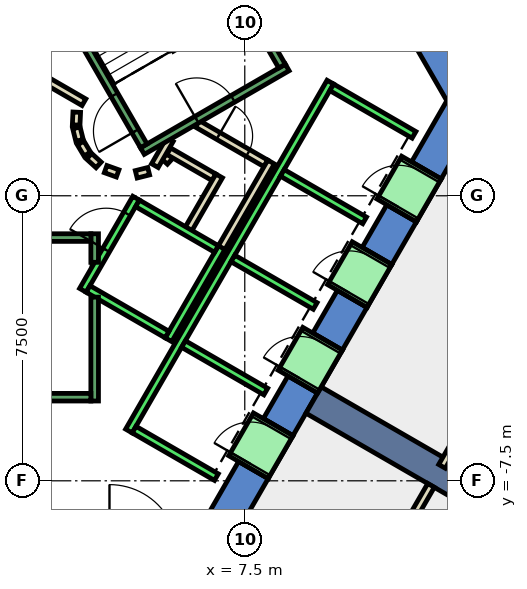
"""IFC4 building model, lengths in metres.
Left out: names, types, materials, properties, quantities, classifications, styles, units other than length and angle.
Written with IfcOpenShell. Run it as: python <this file> out.ifc"""

import sys

from ifc_helpers import new_model, si_unit, direction, frame, frame_2d, origin, place, context, subcontext, project, spatial, polyline, rectangle, outline, extrude, element, fill, save


model = new_model("IFC4")
c1 = context("Model", 3, precision=1e-05, world=origin(), true_north=direction((0.0, 1.0)))
c2 = subcontext(c1, "Body", "Model", "MODEL_VIEW")
j1 = project(units=[si_unit("LENGTHUNIT", "METRE"), si_unit("PLANEANGLEUNIT", "RADIAN")], contexts=[c1])
p1 = place(None, origin())
s1 = spatial("IfcSite", under=j1, at=p1, CompositionType="ELEMENT")
p2 = place(p1, origin())
s2 = spatial("IfcBuilding", under=s1, at=p2, CompositionType="ELEMENT")
p3 = place(p2, frame((0.0, 0.0, 107.6)))
s3 = spatial("IfcBuildingStorey", under=s2, at=p3, CompositionType="ELEMENT", Elevation=107.6)
p4 = place(p3, frame((0.0, 0.0, -0.4)))
e1 = element("IfcWall", 1, at=p4, inside=s3, PredefinedType="SHEAR", context=c2, shape_type="SweptSolid", body=[
    extrude(outline(polyline([(8.517, 11.748), (7.738, 11.298), (12.817, 2.5), (13.856, 2.5), (8.517, 11.748)])), origin(), (0.0, 0.0, 1.0), 4.2),
])
p5 = place(p3, frame((0.0, 0.0, -0.4)))
e2 = element("IfcWall", 2, at=p5, inside=s3, PredefinedType="SHEAR", context=c2, shape_type="SweptSolid", body=[
    extrude(outline(polyline([(8.117, -7.44), (7.338, -6.99), (6.409, -8.6), (6.928, -9.5), (8.117, -7.44)])), origin(), (0.0, 0.0, 1.0), 4.2),
])
p6 = place(p3, frame((0.0, 0.0, -0.4)))
e3 = element("IfcWall", 3, at=p6, inside=s3, PredefinedType="SHEAR", context=c2, shape_type="SweptSolid", body=[
    extrude(outline(polyline([(9.417, -5.189), (8.638, -4.739), (7.988, -5.864), (8.767, -6.314), (9.417, -5.189)])), origin(), (0.0, 0.0, 1.0), 4.2),
])
p7 = place(p3, frame((0.0, 0.0, -0.4)))
e4 = element("IfcWall", 4, at=p7, inside=s3, PredefinedType="SHEAR", context=c2, shape_type="SweptSolid", body=[
    extrude(outline(polyline([(10.717, -2.937), (9.938, -2.487), (9.288, -3.613), (10.067, -4.063), (10.717, -2.937)])), origin(), (0.0, 0.0, 1.0), 4.2),
])
p8 = place(p3, frame((0.0, 0.0, -0.4)))
e5 = element("IfcWall", 5, at=p8, inside=s3, PredefinedType="SHEAR", context=c2, shape_type="SweptSolid", body=[
    extrude(outline(polyline([(12.017, -0.686), (11.238, -0.236), (10.588, -1.361), (11.367, -1.811), (12.017, -0.686)])), origin(), (0.0, 0.0, 1.0), 4.2),
])
p9 = place(p3, frame((0.0, 0.0, -0.4)))
e6 = element("IfcWall", 6, at=p9, inside=s3, PredefinedType="SHEAR", context=c2, shape_type="SweptSolid", body=[
    extrude(outline(polyline([(11.888, 0.89), (12.667, 0.44), (13.856, 2.5), (12.817, 2.5), (11.888, 0.89)])), origin(), (0.0, 0.0, 1.0), 4.2),
])
p10 = place(p3, frame((0.0, 0.0, 3.6)))
e7 = element("IfcWall", 7, at=p10, inside=s3, PredefinedType="SHEAR", context=c2, shape_type="SweptSolid", body=[
    extrude(outline(polyline([(8.767, -6.314), (7.988, -5.864), (7.338, -6.99), (8.117, -7.44), (8.767, -6.314)])), origin(), (0.0, 0.0, 1.0), 0.2),
])
p11 = place(p3, frame((0.0, 0.0, 3.6)))
e8 = element("IfcWall", 8, at=p11, inside=s3, PredefinedType="SHEAR", context=c2, shape_type="SweptSolid", body=[
    extrude(outline(polyline([(10.067, -4.063), (9.288, -3.613), (8.638, -4.739), (9.417, -5.189), (10.067, -4.063)])), origin(), (0.0, 0.0, 1.0), 0.2),
])
p12 = place(p3, frame((0.0, 0.0, 3.6)))
e9 = element("IfcWall", 9, at=p12, inside=s3, PredefinedType="SHEAR", context=c2, shape_type="SweptSolid", body=[
    extrude(outline(polyline([(11.367, -1.811), (10.588, -1.361), (9.938, -2.487), (10.717, -2.937), (11.367, -1.811)])), origin(), (0.0, 0.0, 1.0), 0.2),
])
p13 = place(p3, frame((0.0, 0.0, 3.6)))
e10 = element("IfcWall", 10, at=p13, inside=s3, PredefinedType="SHEAR", context=c2, shape_type="SweptSolid", body=[
    extrude(outline(polyline([(12.667, 0.44), (11.888, 0.89), (11.238, -0.236), (12.017, -0.686), (12.667, 0.44)])), origin(), (0.0, 0.0, 1.0), 0.2),
])
p14 = place(p3, frame((9.31, -5.375, -0.4), z_axis=(0.0, 0.0, 1.0), x_axis=(0.866017533419, -0.500013631625, 0.0)))
e11 = element("IfcWall", 11, at=p14, inside=s3, PredefinedType="SHEAR", context=c2, shape_type="SweptSolid", body=[
    extrude(rectangle(XDim=9.0, YDim=0.8, at=frame_2d((4.5, 0.0))), origin(), (0.0, 0.0, 1.0), 4.2),
])
p15 = place(p3, frame((5.39, 0.898, 0.0), z_axis=(0.0, 0.0, 1.0), x_axis=(0.673828488714, 0.738887791073, 0.0)))
e12 = element("IfcWall", 12, at=p15, inside=s3, PredefinedType="PARTITIONING", context=c2, shape_type="SweptSolid", body=[
    extrude(rectangle(XDim=0.263, YDim=0.2, at=frame_2d((0.131, 0.0))), origin(), (0.0, 0.0, 1.0), 3.8),
])
p16 = place(p3, frame((5.499, 1.172, 0.0), z_axis=(0.0, 0.0, 1.0), x_axis=(0.866333505267, -0.499465972466, 0.0)))
e13 = element("IfcWall", 13, at=p16, inside=s3, PredefinedType="PARTITIONING", context=c2, shape_type="SweptSolid", body=[
    extrude(rectangle(XDim=1.374, YDim=0.2, at=frame_2d((0.687, 0.0))), origin(), (0.0, 0.0, 1.0), 3.8),
])
p17 = place(p3, frame((6.826, 0.522, 0.0), z_axis=(0.0, 0.0, 1.0), x_axis=(-0.500016722714, -0.866015748706, 0.0)))
e14 = element("IfcWall", 14, at=p17, inside=s3, PredefinedType="PARTITIONING", context=c2, shape_type="SweptSolid", body=[
    extrude(rectangle(XDim=1.7, YDim=0.2, at=frame_2d((0.85, 0.0))), origin(), (0.0, 0.0, 1.0), 3.8),
])
p18 = place(p3, frame((6.25, 1.894, 0.0), z_axis=(0.0, 0.0, 1.0), x_axis=(0.866043184279, -0.499969202016, 0.0)))
e15 = element("IfcWall", 15, at=p18, inside=s3, PredefinedType="PARTITIONING", context=c2, shape_type="SweptSolid", body=[
    extrude(rectangle(XDim=2.084, YDim=0.2, at=frame_2d((1.042, 0.0))), origin(), (0.0, 0.0, 1.0), 3.8),
])
p19 = place(p18, frame((0.642, 0.0, 0.0)))
e16 = element("IfcOpeningElement", 16, at=p19, cuts=e15, PredefinedType="OPENING", context=c2, shape_type="SweptSolid", body=[
    extrude(rectangle(XDim=0.9, YDim=2.1, at=frame_2d((0.45, 1.05))), frame((0.0, 0.11, 0.0), z_axis=(0.0, -1.0, 0.0), x_axis=(1.0, 0.0, 0.0)), (0.0, 0.0, 1.0), 0.22),
])
p20 = place(p3, frame((8.192, 0.888, 0.0), z_axis=(0.0, 0.0, 1.0), x_axis=(-0.499940625693, -0.866059680843, 0.0)))
e17 = element("IfcWall", 17, at=p20, inside=s3, PredefinedType="PARTITIONING", context=c2, shape_type="SweptSolid", body=[
    extrude(rectangle(XDim=2.68, YDim=0.2, at=frame_2d((1.34, 0.0))), origin(), (0.0, 0.0, 1.0), 3.8),
])
p21 = place(p3, frame((5.135, 0.793, 0.0), z_axis=(0.0, 0.0, 1.0), x_axis=(0.499526442893, 0.866298639529, 0.0)))
e18 = element("IfcWall", 18, at=p21, inside=s3, PredefinedType="PARTITIONING", context=c2, shape_type="SweptSolid", body=[
    extrude(rectangle(XDim=0.791, YDim=0.2, at=frame_2d((0.396, 0.0))), origin(), (0.0, 0.0, 1.0), 3.8),
])
p22 = place(p3, frame((2.012, 3.186, 0.0), z_axis=(0.0, 0.0, 1.0), x_axis=(0.865891012941, -0.500232699559, 0.0)))
e19 = element("IfcWall", 19, at=p22, inside=s3, PredefinedType="PARTITIONING", context=c2, shape_type="SweptSolid", body=[
    extrude(rectangle(XDim=1.449, YDim=0.2, at=frame_2d((0.725, 0.0))), origin(), (0.0, 0.0, 1.0), 3.8),
])
p23 = place(p3, frame((3.079, 2.199, 0.0), z_axis=(0.0, 0.0, 1.0), x_axis=(-0.047771483479, -0.998858290933, 0.0)))
e20 = element("IfcWall", 20, at=p23, inside=s3, PredefinedType="PARTITIONING", context=c2, shape_type="SweptSolid", body=[
    extrude(rectangle(XDim=0.337, YDim=0.2, at=frame_2d((0.169, 0.0))), origin(), (0.0, 0.0, 1.0), 3.8),
])
p24 = place(p3, frame((3.07, 1.786, 0.0), z_axis=(0.0, 0.0, 1.0), x_axis=(0.242705583207, -0.970099994784, 0.0)))
e21 = element("IfcWall", 21, at=p24, inside=s3, PredefinedType="PARTITIONING", context=c2, shape_type="SweptSolid", body=[
    extrude(rectangle(XDim=0.338, YDim=0.2, at=frame_2d((0.169, 0.0))), origin(), (0.0, 0.0, 1.0), 3.8),
])
for number, where, z_axis, x_axis in (
    (22, (3.182, 1.388, 0.0), (0.0, 0.0, 1.0), (0.512, -0.859, 0.0)),
    (23, (3.404, 1.039, 0.0), (0.0, 0.0, 1.0), (0.74, -0.672, 0.0)),
):
    element("IfcWall", number, at=place(p3, frame(where, z_axis=z_axis, x_axis=x_axis)), inside=s3, PredefinedType="PARTITIONING", context=c2, shape_type="SweptSolid", body=[
        extrude(rectangle(XDim=0.338, YDim=0.2, at=frame_2d((0.169, 0.0))), origin(), (0.0, 0.0, 1.0), 3.8),
    ])
p25 = place(p3, frame((3.838, 0.702, 0.0), z_axis=(0.0, 0.0, 1.0), x_axis=(0.941035081519, -0.338308993895, 0.0)))
e24 = element("IfcWall", 24, at=p25, inside=s3, PredefinedType="PARTITIONING", context=c2, shape_type="SweptSolid", body=[
    extrude(rectangle(XDim=0.337, YDim=0.2, at=frame_2d((0.168, 0.0))), origin(), (0.0, 0.0, 1.0), 3.8),
])
p26 = place(p3, frame((4.644, 0.564, 0.0), z_axis=(0.0, 0.0, 1.0), x_axis=(0.969929076366, 0.243387729394, 0.0)))
e25 = element("IfcWall", 25, at=p26, inside=s3, PredefinedType="PARTITIONING", context=c2, shape_type="SweptSolid", body=[
    extrude(rectangle(XDim=0.337, YDim=0.2, at=frame_2d((0.168, 0.0))), origin(), (0.0, 0.0, 1.0), 3.8),
])
p27 = place(p3, frame((12.401, -7.621, 0.0), z_axis=(0.0, 0.0, 1.0), x_axis=(-0.499983724212, -0.866034800411, 0.0)))
e26 = element("IfcWall", 26, at=p27, inside=s3, PredefinedType="PARTITIONING", context=c2, shape_type="SweptSolid", body=[
    extrude(rectangle(XDim=9.302, YDim=0.2, at=frame_2d((4.651, 0.0))), origin(), (0.0, 0.0, 1.0), 3.8),
])
p28 = place(p3, frame((18.503, 2.949, 0.0), z_axis=(0.0, 0.0, 1.0), x_axis=(-0.49997390151, -0.86604047123, 0.0)))
e27 = element("IfcWall", 27, at=p28, inside=s3, PredefinedType="PARTITIONING", context=c2, shape_type="SweptSolid", body=[
    extrude(rectangle(XDim=11.626, YDim=0.2, at=frame_2d((5.813, 0.0))), origin(), (0.0, 0.0, 1.0), 3.8),
])
p29 = place(p3, frame((3.24, -2.488, 0.0), z_axis=(0.0, 0.0, 1.0), x_axis=(0.49994636267, 0.866056369097, 0.0)))
e28 = element("IfcWall", 28, at=p29, inside=s3, PredefinedType="STANDARD", context=c2, shape_type="SweptSolid", body=[
    extrude(rectangle(XDim=2.8, YDim=0.2, at=frame_2d((1.4, 0.0))), origin(), (0.0, 0.0, 1.0), 3.8),
])
p30 = place(p29, frame((1.225, 0.0, 0.0)))
e29 = element("IfcOpeningElement", 29, at=p30, cuts=e28, PredefinedType="OPENING", context=c2, shape_type="SweptSolid", body=[
    extrude(rectangle(XDim=1.1, YDim=2.1, at=frame_2d((0.55, 1.05))), frame((0.0, 0.11, 0.0), z_axis=(0.0, -1.0, 0.0), x_axis=(1.0, 0.0, 0.0)), (0.0, 0.0, 1.0), 0.22),
])
p31 = place(p3, frame((5.492, -3.788, 0.0), z_axis=(0.0, 0.0, 1.0), x_axis=(0.500011755427, 0.866018616679, 0.0)))
e30 = element("IfcWall", 30, at=p31, inside=s3, PredefinedType="STANDARD", context=c2, shape_type="SweptSolid", body=[
    extrude(rectangle(XDim=2.8, YDim=0.2, at=frame_2d((1.4, 0.0))), origin(), (0.0, 0.0, 1.0), 3.8),
])
p32 = place(p3, frame((3.377, -2.452, 0.0), z_axis=(0.0, 0.0, 1.0), x_axis=(0.865955154139, -0.50012165622, 0.0)))
e31 = element("IfcWall", 31, at=p32, inside=s3, PredefinedType="STANDARD", context=c2, shape_type="SweptSolid", body=[
    extrude(rectangle(XDim=2.4, YDim=0.2, at=frame_2d((1.2, 0.0))), origin(), (0.0, 0.0, 1.0), 3.8),
])
p33 = place(p3, frame((4.677, -0.2, 0.0), z_axis=(0.0, 0.0, 1.0), x_axis=(0.865973769406, -0.500089422704, 0.0)))
e32 = element("IfcWall", 32, at=p33, inside=s3, PredefinedType="STANDARD", context=c2, shape_type="SweptSolid", body=[
    extrude(rectangle(XDim=2.399, YDim=0.2, at=frame_2d((1.2, 0.0))), origin(), (0.0, 0.0, 1.0), 3.8),
])
p34 = place(p3, frame((4.451, -6.19, 0.0), z_axis=(0.0, 0.0, 1.0), x_axis=(0.50000090737, 0.866024879913, 0.0)))
e33 = element("IfcWall", 33, at=p34, inside=s3, PredefinedType="STANDARD", context=c2, shape_type="SweptSolid", body=[
    extrude(rectangle(XDim=10.6, YDim=0.2, at=frame_2d((5.3, 0.0))), origin(), (0.0, 0.0, 1.0), 3.8),
])
for number, where, z_axis, x_axis in (
    (34, (4.588, -6.153, 0.0), (0.0, 0.0, 1.0), (0.866, -0.5, 0.0)),
    (35, (5.888, -3.902, 0.0), (0.0, 0.0, 1.0), (0.866, -0.5, 0.0)),
    (36, (7.188, -1.65, 0.0), (0.0, 0.0, 1.0), (0.866, -0.5, 0.0)),
    (37, (8.488, 0.602, 0.0), (0.0, 0.0, 1.0), (0.866, -0.5, 0.0)),
):
    element("IfcWall", number, at=place(p3, frame(where, z_axis=z_axis, x_axis=x_axis)), inside=s3, PredefinedType="STANDARD", context=c2, shape_type="SweptSolid", body=[
        extrude(rectangle(XDim=2.5, YDim=0.2, at=frame_2d((1.25, 0.0))), origin(), (0.0, 0.0, 1.0), 3.8),
    ])
p35 = place(p3, frame((9.788, 2.853, 0.0), z_axis=(0.0, 0.0, 1.0), x_axis=(0.865998541277, -0.500046524342, 0.0)))
e38 = element("IfcWall", 38, at=p35, inside=s3, PredefinedType="STANDARD", context=c2, shape_type="SweptSolid", body=[
    extrude(rectangle(XDim=2.5, YDim=0.2, at=frame_2d((1.25, 0.0))), origin(), (0.0, 0.0, 1.0), 3.8),
])
p36 = place(p3, frame((7.598, -7.14, 0.0), z_axis=(0.0, 0.0, 1.0), x_axis=(0.500362116554, 0.865816234728, 0.0)))
e39 = element("IfcWall", 39, at=p36, inside=s3, PredefinedType="STANDARD", context=c2, shape_type="SweptSolid", body=[
    extrude(rectangle(XDim=1.299, YDim=1.2, at=frame_2d((0.65, 0.0))), origin(), (0.0, 0.0, 1.0), 2.4),
])
p37 = place(p36, frame((0.1, 0.0, 0.0)))
e40 = element("IfcOpeningElement", 40, at=p37, cuts=e39, PredefinedType="OPENING", context=c2, shape_type="SweptSolid", body=[
    extrude(rectangle(XDim=1.1, YDim=2.3, at=frame_2d((0.55, 1.15))), frame((0.0, 0.61, 0.0), z_axis=(0.0, -1.0, 0.0), x_axis=(1.0, 0.0, 0.0)), (0.0, 0.0, 1.0), 1.22),
])
p38 = place(p3, frame((8.898, -4.889, 0.0), z_axis=(0.0, 0.0, 1.0), x_axis=(0.500036693733, 0.866004217611, 0.0)))
e41 = element("IfcWall", 41, at=p38, inside=s3, PredefinedType="STANDARD", context=c2, shape_type="SweptSolid", body=[
    extrude(rectangle(XDim=1.3, YDim=1.2, at=frame_2d((0.65, 0.0))), origin(), (0.0, 0.0, 1.0), 2.4),
])
p39 = place(p38, frame((0.1, 0.0, 0.0)))
e42 = element("IfcOpeningElement", 42, at=p39, cuts=e41, PredefinedType="OPENING", context=c2, shape_type="SweptSolid", body=[
    extrude(rectangle(XDim=1.1, YDim=2.3, at=frame_2d((0.55, 1.15))), frame((0.0, 0.61, 0.0), z_axis=(0.0, -1.0, 0.0), x_axis=(1.0, 0.0, 0.0)), (0.0, 0.0, 1.0), 1.22),
])
p40 = place(p3, frame((10.198, -2.637, 0.0), z_axis=(0.0, 0.0, 1.0), x_axis=(0.49989585183, 0.866085525409, 0.0)))
e43 = element("IfcWall", 43, at=p40, inside=s3, PredefinedType="STANDARD", context=c2, shape_type="SweptSolid", body=[
    extrude(rectangle(XDim=1.3, YDim=1.2, at=frame_2d((0.65, 0.0))), origin(), (0.0, 0.0, 1.0), 2.4),
])
p41 = place(p40, frame((0.1, 0.0, 0.0)))
e44 = element("IfcOpeningElement", 44, at=p41, cuts=e43, PredefinedType="OPENING", context=c2, shape_type="SweptSolid", body=[
    extrude(rectangle(XDim=1.1, YDim=2.3, at=frame_2d((0.55, 1.15))), frame((0.0, 0.61, 0.0), z_axis=(0.0, -1.0, 0.0), x_axis=(1.0, 0.0, 0.0)), (0.0, 0.0, 1.0), 1.22),
])
p42 = place(p3, frame((11.498, -0.385, 0.0), z_axis=(0.0, 0.0, 1.0), x_axis=(0.500221244143, 0.865897630733, 0.0)))
e45 = element("IfcWall", 45, at=p42, inside=s3, PredefinedType="STANDARD", context=c2, shape_type="SweptSolid", body=[
    extrude(rectangle(XDim=1.299, YDim=1.2, at=frame_2d((0.65, 0.0))), origin(), (0.0, 0.0, 1.0), 2.4),
])
p43 = place(p42, frame((0.1, 0.0, 0.0)))
e46 = element("IfcOpeningElement", 46, at=p43, cuts=e45, PredefinedType="OPENING", context=c2, shape_type="SweptSolid", body=[
    extrude(rectangle(XDim=1.1, YDim=2.3, at=frame_2d((0.55, 1.15))), frame((0.0, 0.61, 0.0), z_axis=(0.0, -1.0, 0.0), x_axis=(1.0, 0.0, 0.0)), (0.0, 0.0, 1.0), 1.22),
])
p44 = place(p3, frame((3.55, -2.667, 0.0), z_axis=(0.0, 0.0, 1.0), x_axis=(0.0, -1.0, 0.0)))
e47 = element("IfcWall", 47, at=p44, inside=s3, PredefinedType="STANDARD", context=c2, shape_type="SweptSolid", body=[
    extrude(rectangle(XDim=2.733, YDim=0.2, at=frame_2d((1.366, 0.0))), origin(), (0.0, 0.0, 1.0), 3.8),
])
p45 = place(p3, frame((3.55, -1.0, 0.0), z_axis=(0.0, 0.0, 1.0), x_axis=(0.0, -1.0, 0.0)))
e48 = element("IfcWall", 48, at=p45, inside=s3, PredefinedType="STANDARD", context=c2, shape_type="SweptSolid", body=[
    extrude(rectangle(XDim=0.751, YDim=0.2, at=frame_2d((0.375, 0.0))), origin(), (0.0, 0.0, 1.0), 3.8),
])
p46 = place(p3, frame((-3.45, -1.1, 0.0), z_axis=(0.0, 0.0, 1.0), x_axis=(1.0, 0.0, 0.0)))
e49 = element("IfcWall", 49, at=p46, inside=s3, PredefinedType="STANDARD", context=c2, shape_type="SweptSolid", body=[
    extrude(rectangle(XDim=6.9, YDim=0.2, at=frame_2d((3.45, 0.0))), origin(), (0.0, 0.0, 1.0), 3.8),
])
p47 = place(p46, frame((0.45, 0.0, 0.0)))
e50 = element("IfcOpeningElement", 50, at=p47, cuts=e49, PredefinedType="OPENING", context=c2, shape_type="SweptSolid", body=[
    extrude(rectangle(XDim=1.1, YDim=2.2, at=frame_2d((0.55, 1.1))), frame((0.0, 0.11, 0.0), z_axis=(0.0, -1.0, 0.0), x_axis=(1.0, 0.0, 0.0)), (0.0, 0.0, 1.0), 0.22),
])
p48 = place(p3, frame((-3.45, -5.3, 0.0), z_axis=(0.0, 0.0, 1.0), x_axis=(1.0, 0.0, 0.0)))
e51 = element("IfcWall", 51, at=p48, inside=s3, PredefinedType="STANDARD", context=c2, shape_type="SweptSolid", body=[
    extrude(rectangle(XDim=6.9, YDim=0.2, at=frame_2d((3.45, 0.0))), origin(), (0.0, 0.0, 1.0), 3.8),
])
p49 = place(p3, frame((4.806, 1.176, 0.0), z_axis=(0.0, 0.0, 1.0), x_axis=(0.866059941101, 0.499940174841, 0.0)))
e52 = element("IfcWall", 52, at=p49, inside=s3, PredefinedType="STANDARD", context=c2, shape_type="SweptSolid", body=[
    extrude(rectangle(XDim=4.4, YDim=0.2, at=frame_2d((2.2, 0.0))), origin(), (0.0, 0.0, 1.0), 3.8),
])
p50 = place(p49, frame((1.65, 0.0, 0.0)))
e53 = element("IfcOpeningElement", 53, at=p50, cuts=e52, PredefinedType="OPENING", context=c2, shape_type="SweptSolid", body=[
    extrude(rectangle(XDim=1.1, YDim=2.2, at=frame_2d((0.55, 1.1))), frame((0.0, 0.11, 0.0), z_axis=(0.0, -1.0, 0.0), x_axis=(1.0, 0.0, 0.0)), (0.0, 0.0, 1.0), 0.22),
])
p51 = place(p3, frame((4.843, 1.312, 0.0), z_axis=(0.0, 0.0, 1.0), x_axis=(-0.499963383562, 0.866046543262, 0.0)))
e54 = element("IfcWall", 54, at=p51, inside=s3, PredefinedType="STANDARD", context=c2, shape_type="SweptSolid", body=[
    extrude(rectangle(XDim=6.9, YDim=0.2, at=frame_2d((3.45, 0.0))), origin(), (0.0, 0.0, 1.0), 3.8),
])
p52 = place(p51, frame((0.45, 0.0, 0.0)))
e55 = element("IfcOpeningElement", 55, at=p52, cuts=e54, PredefinedType="OPENING", context=c2, shape_type="SweptSolid", body=[
    extrude(rectangle(XDim=1.1, YDim=2.2, at=frame_2d((0.55, 1.1))), frame((0.0, 0.11, 0.0), z_axis=(0.0, -1.0, 0.0), x_axis=(1.0, 0.0, 0.0)), (0.0, 0.0, 1.0), 0.22),
])
p53 = place(p3, frame((8.48, 3.412, 0.0), z_axis=(0.0, 0.0, 1.0), x_axis=(-0.499978703459, 0.866037698999, 0.0)))
e56 = element("IfcWall", 56, at=p53, inside=s3, PredefinedType="STANDARD", context=c2, shape_type="SweptSolid", body=[
    extrude(rectangle(XDim=6.9, YDim=0.2, at=frame_2d((3.45, 0.0))), origin(), (0.0, 0.0, 1.0), 3.8),
])
p54 = place(p19, origin())
e57 = element("IfcDoor", 57, at=p54, inside=s3, OperationType="SINGLE_SWING_LEFT", PredefinedType="DOOR", context=c2, shape_type="SweptSolid", body=[
    extrude(rectangle(XDim=0.9, YDim=2.1, at=frame_2d((0.45, 1.05))), frame((0.0, 0.025, 0.0), z_axis=(0.0, -1.0, 0.0), x_axis=(1.0, 0.0, 0.0)), (0.0, 0.0, 1.0), 0.05),
])
fill(e16, e57)
p55 = place(p37, origin())
e58 = element("IfcDoor", 58, at=p55, inside=s3, OperationType="SLIDING_TO_LEFT", PredefinedType="DOOR", context=c2, shape_type="SweptSolid", body=[
    extrude(rectangle(XDim=1.1, YDim=2.3, at=frame_2d((0.55, 1.15))), frame((0.0, 0.025, 0.0), z_axis=(0.0, -1.0, 0.0), x_axis=(1.0, 0.0, 0.0)), (0.0, 0.0, 1.0), 0.05),
])
fill(e40, e58)
p56 = place(p39, origin())
e59 = element("IfcDoor", 59, at=p56, inside=s3, OperationType="SLIDING_TO_LEFT", PredefinedType="DOOR", context=c2, shape_type="SweptSolid", body=[
    extrude(rectangle(XDim=1.1, YDim=2.3, at=frame_2d((0.55, 1.15))), frame((0.0, 0.025, 0.0), z_axis=(0.0, -1.0, 0.0), x_axis=(1.0, 0.0, 0.0)), (0.0, 0.0, 1.0), 0.05),
])
fill(e42, e59)
p57 = place(p41, origin())
e60 = element("IfcDoor", 60, at=p57, inside=s3, OperationType="SLIDING_TO_LEFT", PredefinedType="DOOR", context=c2, shape_type="SweptSolid", body=[
    extrude(rectangle(XDim=1.1, YDim=2.3, at=frame_2d((0.55, 1.15))), frame((0.0, 0.025, 0.0), z_axis=(0.0, -1.0, 0.0), x_axis=(1.0, 0.0, 0.0)), (0.0, 0.0, 1.0), 0.05),
])
fill(e44, e60)
p58 = place(p43, origin())
e61 = element("IfcDoor", 61, at=p58, inside=s3, OperationType="SLIDING_TO_LEFT", PredefinedType="DOOR", context=c2, shape_type="SweptSolid", body=[
    extrude(rectangle(XDim=1.1, YDim=2.3, at=frame_2d((0.55, 1.15))), frame((0.0, 0.025, 0.0), z_axis=(0.0, -1.0, 0.0), x_axis=(1.0, 0.0, 0.0)), (0.0, 0.0, 1.0), 0.05),
])
fill(e46, e61)
p59 = place(p30, origin())
e62 = element("IfcDoor", 62, at=p59, inside=s3, OperationType="SLIDING_TO_LEFT", PredefinedType="DOOR", context=c2, shape_type="SweptSolid", body=[
    extrude(rectangle(XDim=1.1, YDim=2.1, at=frame_2d((0.55, 1.05))), frame((0.0, 0.025, 0.0), z_axis=(0.0, -1.0, 0.0), x_axis=(1.0, 0.0, 0.0)), (0.0, 0.0, 1.0), 0.05),
])
fill(e29, e62)
p60 = place(p52, origin())
e63 = element("IfcDoor", 63, at=p60, inside=s3, OperationType="SINGLE_SWING_LEFT", PredefinedType="DOOR", context=c2, shape_type="SweptSolid", body=[
    extrude(rectangle(XDim=1.1, YDim=2.2, at=frame_2d((0.55, 1.1))), frame((0.0, 0.025, 0.0), z_axis=(0.0, -1.0, 0.0), x_axis=(1.0, 0.0, 0.0)), (0.0, 0.0, 1.0), 0.05),
])
fill(e55, e63)
p61 = place(p50, origin())
e64 = element("IfcDoor", 64, at=p61, inside=s3, OperationType="SINGLE_SWING_LEFT", PredefinedType="DOOR", context=c2, shape_type="SweptSolid", body=[
    extrude(rectangle(XDim=1.1, YDim=2.2, at=frame_2d((0.55, 1.1))), frame((0.0, 0.025, 0.0), z_axis=(0.0, -1.0, 0.0), x_axis=(1.0, 0.0, 0.0)), (0.0, 0.0, 1.0), 0.05),
])
fill(e53, e64)
save(model, sys.argv[1])
